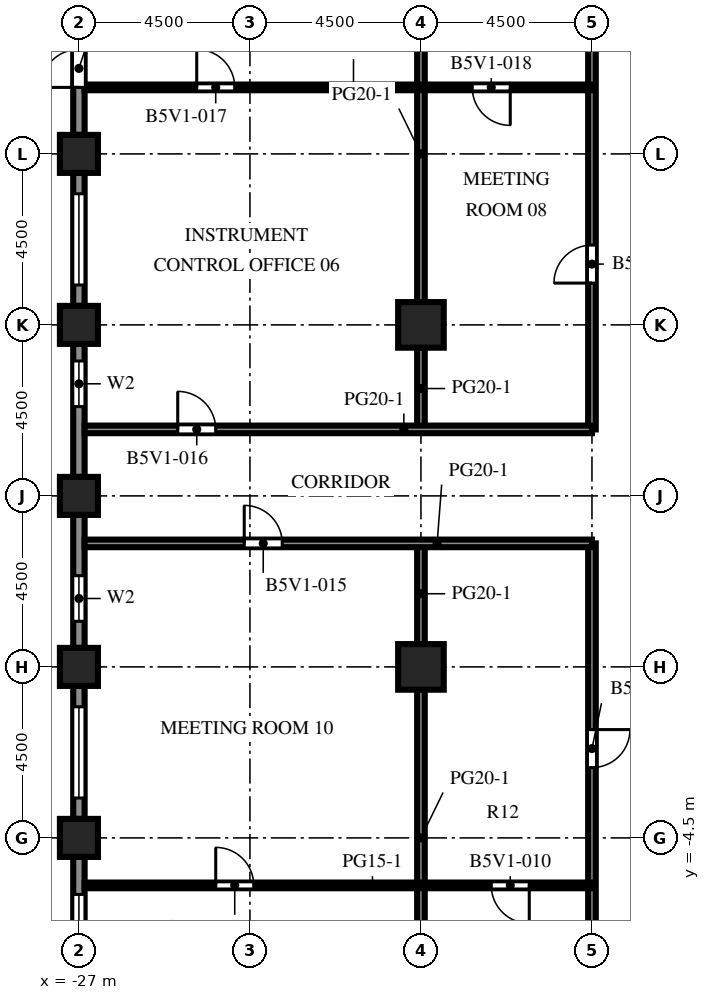
"""IFC4 building model, lengths in metres.
Left out: names, types, materials, properties, quantities, classifications, styles, units other than length and angle.
Written with IfcOpenShell. Run it as: python <this file> out.ifc"""

import sys

from ifc_helpers import new_model, si_unit, direction, frame, frame_2d, origin, origin_2d, place, context, subcontext, project, spatial, rectangle, extrude, element, fill, save


model = new_model("IFC4")
c1 = context("Model", 3, precision=1e-05, world=origin(), true_north=direction((0.0, 1.0)))
c2 = subcontext(c1, "Body", "Model", "MODEL_VIEW")
j1 = project(units=[si_unit("LENGTHUNIT", "METRE"), si_unit("PLANEANGLEUNIT", "RADIAN")], contexts=[c1])
p1 = place(None, origin())
s1 = spatial("IfcSite", under=j1, at=p1, CompositionType="ELEMENT")
p2 = place(p1, origin())
s2 = spatial("IfcBuilding", under=s1, at=p2, CompositionType="ELEMENT")
p3 = place(p2, frame((0.0, 0.0, 173.2)))
s3 = spatial("IfcBuildingStorey", under=s2, at=p3, CompositionType="ELEMENT", Elevation=173.2)
for number, where, z_axis, x_axis in (
    (1, (-27.0, -4.5, 0.0), (0.0, 0.0, 1.0), (1.0, 0.0, 0.0)),
    (2, (-27.0, 0.0, 0.0), (0.0, 0.0, 1.0), (1.0, 0.0, 0.0)),
    (3, (-27.0, 4.5, 0.0), (0.0, 0.0, 1.0), (1.0, 0.0, 0.0)),
    (4, (-27.0, 9.0, 0.0), (0.0, 0.0, 1.0), (1.0, 0.0, 0.0)),
    (5, (-27.0, 13.5, 0.0), (0.0, 0.0, 1.0), (1.0, 0.0, 0.0)),
):
    element("IfcColumn", number, at=place(p3, frame(where, z_axis=z_axis, x_axis=x_axis)), inside=s3, PredefinedType="COLUMN", context=c2, shape_type="SweptSolid", body=[
        extrude(rectangle(XDim=1.0, YDim=1.0, at=origin_2d()), origin(), (0.0, 0.0, 1.0), 4.1),
    ])
for number, where, z_axis, x_axis in (
    (6, (-18.0, 0.0, 0.0), (0.0, 0.0, 1.0), (1.0, 0.0, 0.0)),
    (7, (-18.0, 9.0, 0.0), (0.0, 0.0, 1.0), (1.0, 0.0, 0.0)),
):
    element("IfcColumn", number, at=place(p3, frame(where, z_axis=z_axis, x_axis=x_axis)), inside=s3, PredefinedType="COLUMN", context=c2, shape_type="SweptSolid", body=[
        extrude(rectangle(XDim=1.2, YDim=1.2, at=origin_2d()), origin(), (0.0, 0.0, 1.0), 4.1),
    ])
p4 = place(p3, frame((-27.0, 14.0, 0.0), z_axis=(0.0, 0.0, 1.0), x_axis=(0.0, 1.0, 0.0)))
e8 = element("IfcWall", 8, at=p4, inside=s3, PredefinedType="SOLIDWALL", context=c2, shape_type="SweptSolid", body=[
    extrude(rectangle(XDim=3.5, YDim=0.3, at=frame_2d((1.75, 0.0))), origin(), (0.0, 0.0, 1.0), 2.85),
])
p5 = place(p4, frame((1.25, 0.0, 0.0)))
e9 = element("IfcOpeningElement", 9, at=p5, cuts=e8, PredefinedType="OPENING", context=c2, shape_type="SweptSolid", body=[
    extrude(rectangle(XDim=1.0, YDim=2.2, at=frame_2d((0.5, 1.1))), frame((0.0, 0.16, 0.0), z_axis=(0.0, -1.0, 0.0), x_axis=(1.0, 0.0, 0.0)), (0.0, 0.0, 1.0), 0.32),
])
p6 = place(p3, frame((-27.0, 9.5, 0.0), z_axis=(0.0, 0.0, 1.0), x_axis=(0.0, 1.0, 0.0)))
e10 = element("IfcWall", 10, at=p6, inside=s3, PredefinedType="SOLIDWALL", context=c2, shape_type="SweptSolid", body=[
    extrude(rectangle(XDim=3.5, YDim=0.3, at=frame_2d((1.75, 0.0))), origin(), (0.0, 0.0, 1.0), 2.85),
])
p7 = place(p6, frame((0.55, 0.0, 0.8)))
e11 = element("IfcOpeningElement", 11, at=p7, cuts=e10, PredefinedType="OPENING", context=c2, shape_type="SweptSolid", body=[
    extrude(rectangle(XDim=2.4, YDim=1.7, at=frame_2d((1.2, 0.85))), frame((0.0, 0.16, 0.0), z_axis=(0.0, -1.0, 0.0), x_axis=(1.0, 0.0, 0.0)), (0.0, 0.0, 1.0), 0.32),
])
p8 = place(p3, frame((-27.0, 5.0, 0.0), z_axis=(0.0, 0.0, 1.0), x_axis=(0.0, 1.0, 0.0)))
e12 = element("IfcWall", 12, at=p8, inside=s3, PredefinedType="SOLIDWALL", context=c2, shape_type="SweptSolid", body=[
    extrude(rectangle(XDim=3.5, YDim=0.3, at=frame_2d((1.75, 0.0))), origin(), (0.0, 0.0, 1.0), 2.85),
])
p9 = place(p8, frame((1.85, 0.0, 0.8)))
e13 = element("IfcOpeningElement", 13, at=p9, cuts=e12, PredefinedType="OPENING", context=c2, shape_type="SweptSolid", body=[
    extrude(rectangle(XDim=1.2, YDim=1.7, at=frame_2d((0.6, 0.85))), frame((0.0, 0.16, 0.0), z_axis=(0.0, -1.0, 0.0), x_axis=(1.0, 0.0, 0.0)), (0.0, 0.0, 1.0), 0.32),
])
p10 = place(p3, frame((-27.0, 0.5, 0.0), z_axis=(0.0, 0.0, 1.0), x_axis=(0.0, 1.0, 0.0)))
e14 = element("IfcWall", 14, at=p10, inside=s3, PredefinedType="SOLIDWALL", context=c2, shape_type="SweptSolid", body=[
    extrude(rectangle(XDim=3.5, YDim=0.3, at=frame_2d((1.75, 0.0))), origin(), (0.0, 0.0, 1.0), 2.85),
])
p11 = place(p10, frame((0.7, 0.0, 0.8)))
e15 = element("IfcOpeningElement", 15, at=p11, cuts=e14, PredefinedType="OPENING", context=c2, shape_type="SweptSolid", body=[
    extrude(rectangle(XDim=1.2, YDim=1.7, at=frame_2d((0.6, 0.85))), frame((0.0, 0.16, 0.0), z_axis=(0.0, -1.0, 0.0), x_axis=(1.0, 0.0, 0.0)), (0.0, 0.0, 1.0), 0.32),
])
p12 = place(p3, frame((-27.0, -4.0, 0.0), z_axis=(0.0, 0.0, 1.0), x_axis=(0.0, 1.0, 0.0)))
e16 = element("IfcWall", 16, at=p12, inside=s3, PredefinedType="SOLIDWALL", context=c2, shape_type="SweptSolid", body=[
    extrude(rectangle(XDim=3.5, YDim=0.3, at=frame_2d((1.75, 0.0))), origin(), (0.0, 0.0, 1.0), 2.85),
])
p13 = place(p12, frame((0.55, 0.0, 0.8)))
e17 = element("IfcOpeningElement", 17, at=p13, cuts=e16, PredefinedType="OPENING", context=c2, shape_type="SweptSolid", body=[
    extrude(rectangle(XDim=2.4, YDim=1.7, at=frame_2d((1.2, 0.85))), frame((0.0, 0.16, 0.0), z_axis=(0.0, -1.0, 0.0), x_axis=(1.0, 0.0, 0.0)), (0.0, 0.0, 1.0), 0.32),
])
p14 = place(p3, frame((-27.0, -8.5, 0.0), z_axis=(0.0, 0.0, 1.0), x_axis=(0.0, 1.0, 0.0)))
e18 = element("IfcWall", 18, at=p14, inside=s3, PredefinedType="SOLIDWALL", context=c2, shape_type="SweptSolid", body=[
    extrude(rectangle(XDim=3.5, YDim=0.3, at=frame_2d((1.75, 0.0))), origin(), (0.0, 0.0, 1.0), 2.85),
])
p15 = place(p14, frame((0.113, 0.0, 0.8)))
e19 = element("IfcOpeningElement", 19, at=p15, cuts=e18, PredefinedType="OPENING", context=c2, shape_type="SweptSolid", body=[
    extrude(rectangle(XDim=2.4, YDim=1.7, at=frame_2d((1.2, 0.85))), frame((0.0, 0.16, 0.0), z_axis=(0.0, -1.0, 0.0), x_axis=(1.0, 0.0, 0.0)), (0.0, 0.0, 1.0), 0.32),
])
p16 = place(p3, frame((-18.0, -8.4, 0.0), z_axis=(0.0, 0.0, 1.0), x_axis=(0.0, 1.0, 0.0)))
e20 = element("IfcWall", 20, at=p16, inside=s3, PredefinedType="PARTITIONING", context=c2, shape_type="SweptSolid", body=[
    extrude(rectangle(XDim=7.8, YDim=0.2, at=frame_2d((3.9, 0.0))), origin(), (0.0, 0.0, 1.0), 3.65),
])
p17 = place(p3, frame((-18.0, 0.6, 0.0), z_axis=(0.0, 0.0, 1.0), x_axis=(0.0, 1.0, 0.0)))
e21 = element("IfcWall", 21, at=p17, inside=s3, PredefinedType="PARTITIONING", context=c2, shape_type="SweptSolid", body=[
    extrude(rectangle(XDim=2.65, YDim=0.2, at=frame_2d((1.325, 0.0))), origin(), (0.0, 0.0, 1.0), 3.65),
])
p18 = place(p3, frame((-18.0, 6.25, 0.0), z_axis=(0.0, 0.0, 1.0), x_axis=(0.0, 1.0, 0.0)))
e22 = element("IfcWall", 22, at=p18, inside=s3, PredefinedType="PARTITIONING", context=c2, shape_type="SweptSolid", body=[
    extrude(rectangle(XDim=2.15, YDim=0.2, at=frame_2d((1.075, 0.0))), origin(), (0.0, 0.0, 1.0), 3.65),
])
p19 = place(p3, frame((-18.0, 9.6, 0.0), z_axis=(0.0, 0.0, 1.0), x_axis=(0.0, 1.0, 0.0)))
e23 = element("IfcWall", 23, at=p19, inside=s3, PredefinedType="PARTITIONING", context=c2, shape_type="SweptSolid", body=[
    extrude(rectangle(XDim=7.8, YDim=0.2, at=frame_2d((3.9, 0.0))), origin(), (0.0, 0.0, 1.0), 3.65),
])
p20 = place(p3, frame((-13.5, -26.5, 0.0), z_axis=(0.0, 0.0, 1.0), x_axis=(0.0, 1.0, 0.0)))
e24 = element("IfcWall", 24, at=p20, inside=s3, PredefinedType="PARTITIONING", context=c2, shape_type="SweptSolid", body=[
    extrude(rectangle(XDim=29.75, YDim=0.2, at=frame_2d((14.875, 0.0))), origin(), (0.0, 0.0, 1.0), 3.65),
])
p21 = place(p20, frame((23.85, 0.0, 0.0)))
e25 = element("IfcOpeningElement", 25, at=p21, cuts=e24, PredefinedType="OPENING", context=c2, shape_type="SweptSolid", body=[
    extrude(rectangle(XDim=1.0, YDim=2.1, at=frame_2d((0.5, 1.05))), frame((0.0, 0.11, 0.0), z_axis=(0.0, -1.0, 0.0), x_axis=(1.0, 0.0, 0.0)), (0.0, 0.0, 1.0), 0.22),
])
p22 = place(p3, frame((-13.5, 6.25, 0.0), z_axis=(0.0, 0.0, 1.0), x_axis=(0.0, 1.0, 0.0)))
e26 = element("IfcWall", 26, at=p22, inside=s3, PredefinedType="PARTITIONING", context=c2, shape_type="SweptSolid", body=[
    extrude(rectangle(XDim=20.25, YDim=0.2, at=frame_2d((10.125, 0.0))), origin(), (0.0, 0.0, 1.0), 3.65),
])
p23 = place(p22, frame((3.85, 0.0, 0.0)))
e27 = element("IfcOpeningElement", 27, at=p23, cuts=e26, PredefinedType="OPENING", context=c2, shape_type="SweptSolid", body=[
    extrude(rectangle(XDim=1.0, YDim=2.1, at=frame_2d((0.5, 1.05))), frame((0.0, 0.11, 0.0), z_axis=(0.0, -1.0, 0.0), x_axis=(1.0, 0.0, 0.0)), (0.0, 0.0, 1.0), 0.22),
])
p24 = place(p3, frame((-13.5, -5.75, 0.0), z_axis=(0.0, 0.0, 1.0), x_axis=(-1.0, 0.0, 0.0)))
e28 = element("IfcWall", 28, at=p24, inside=s3, PredefinedType="PARTITIONING", context=c2, shape_type="SweptSolid", body=[
    extrude(rectangle(XDim=13.35, YDim=0.15, at=frame_2d((6.675, 0.0))), origin(), (0.0, 0.0, 1.0), 3.65),
])
p25 = place(p24, frame((8.9, 0.0, 0.0)))
e29 = element("IfcOpeningElement", 29, at=p25, cuts=e28, PredefinedType="OPENING", context=c2, shape_type="SweptSolid", body=[
    extrude(rectangle(XDim=1.0, YDim=2.1, at=frame_2d((0.5, 1.05))), frame((0.0, 0.085, 0.0), z_axis=(0.0, -1.0, 0.0), x_axis=(1.0, 0.0, 0.0)), (0.0, 0.0, 1.0), 0.17),
])
p26 = place(p24, frame((1.65, 0.0, 0.0)))
e30 = element("IfcOpeningElement", 30, at=p26, cuts=e28, PredefinedType="OPENING", context=c2, shape_type="SweptSolid", body=[
    extrude(rectangle(XDim=1.0, YDim=2.1, at=frame_2d((0.5, 1.05))), frame((0.0, 0.085, 0.0), z_axis=(0.0, -1.0, 0.0), x_axis=(1.0, 0.0, 0.0)), (0.0, 0.0, 1.0), 0.17),
])
p27 = place(p3, frame((-13.5, 3.25, 0.0), z_axis=(0.0, 0.0, 1.0), x_axis=(-1.0, 0.0, 0.0)))
e31 = element("IfcWall", 31, at=p27, inside=s3, PredefinedType="PARTITIONING", context=c2, shape_type="SweptSolid", body=[
    extrude(rectangle(XDim=13.35, YDim=0.2, at=frame_2d((6.675, 0.0))), origin(), (0.0, 0.0, 1.0), 3.65),
])
p28 = place(p27, frame((8.15, 0.0, 0.0)))
e32 = element("IfcOpeningElement", 32, at=p28, cuts=e31, PredefinedType="OPENING", context=c2, shape_type="SweptSolid", body=[
    extrude(rectangle(XDim=1.0, YDim=2.1, at=frame_2d((0.5, 1.05))), frame((0.0, 0.11, 0.0), z_axis=(0.0, -1.0, 0.0), x_axis=(1.0, 0.0, 0.0)), (0.0, 0.0, 1.0), 0.22),
])
p29 = place(p3, frame((-26.85, 6.25, 0.0), z_axis=(0.0, 0.0, 1.0), x_axis=(1.0, 0.0, 0.0)))
e33 = element("IfcWall", 33, at=p29, inside=s3, PredefinedType="PARTITIONING", context=c2, shape_type="SweptSolid", body=[
    extrude(rectangle(XDim=13.35, YDim=0.2, at=frame_2d((6.675, 0.0))), origin(), (0.0, 0.0, 1.0), 3.65),
])
p30 = place(p29, frame((2.45, 0.0, 0.0)))
e34 = element("IfcOpeningElement", 34, at=p30, cuts=e33, PredefinedType="OPENING", context=c2, shape_type="SweptSolid", body=[
    extrude(rectangle(XDim=1.0, YDim=2.1, at=frame_2d((0.5, 1.05))), frame((0.0, 0.11, 0.0), z_axis=(0.0, -1.0, 0.0), x_axis=(1.0, 0.0, 0.0)), (0.0, 0.0, 1.0), 0.22),
])
p31 = place(p3, frame((-26.85, 15.25, 0.0), z_axis=(0.0, 0.0, 1.0), x_axis=(1.0, 0.0, 0.0)))
e35 = element("IfcWall", 35, at=p31, inside=s3, PredefinedType="PARTITIONING", context=c2, shape_type="SweptSolid", body=[
    extrude(rectangle(XDim=13.35, YDim=0.15, at=frame_2d((6.675, 0.0))), origin(), (0.0, 0.0, 1.0), 3.65),
])
p32 = place(p31, frame((2.95, 0.0, 0.0)))
e36 = element("IfcOpeningElement", 36, at=p32, cuts=e35, PredefinedType="OPENING", context=c2, shape_type="SweptSolid", body=[
    extrude(rectangle(XDim=1.0, YDim=2.1, at=frame_2d((0.5, 1.05))), frame((0.0, 0.085, 0.0), z_axis=(0.0, -1.0, 0.0), x_axis=(1.0, 0.0, 0.0)), (0.0, 0.0, 1.0), 0.17),
])
p33 = place(p31, frame((10.2, 0.0, 0.0)))
e37 = element("IfcOpeningElement", 37, at=p33, cuts=e35, PredefinedType="OPENING", context=c2, shape_type="SweptSolid", body=[
    extrude(rectangle(XDim=1.0, YDim=2.1, at=frame_2d((0.5, 1.05))), frame((0.0, 0.085, 0.0), z_axis=(0.0, -1.0, 0.0), x_axis=(1.0, 0.0, 0.0)), (0.0, 0.0, 1.0), 0.17),
])
p34 = place(p5, origin())
e38 = element("IfcDoor", 38, at=p34, inside=s3, OperationType="SINGLE_SWING_LEFT", PredefinedType="DOOR", context=c2, shape_type="SweptSolid", body=[
    extrude(rectangle(XDim=1.0, YDim=2.2, at=frame_2d((0.5, 1.1))), frame((0.0, 0.025, 0.0), z_axis=(0.0, -1.0, 0.0), x_axis=(1.0, 0.0, 0.0)), (0.0, 0.0, 1.0), 0.05),
])
fill(e9, e38)
p35 = place(p7, origin())
e39 = element("IfcWindow", 39, at=p35, inside=s3, PartitioningType="SINGLE_PANEL", PredefinedType="WINDOW", context=c2, shape_type="SweptSolid", body=[
    extrude(rectangle(XDim=2.4, YDim=1.7, at=frame_2d((1.2, 0.85))), frame((0.0, 0.03, 0.0), z_axis=(0.0, -1.0, 0.0), x_axis=(1.0, 0.0, 0.0)), (0.0, 0.0, 1.0), 0.06),
])
fill(e11, e39)
p36 = place(p9, origin())
e40 = element("IfcWindow", 40, at=p36, inside=s3, PartitioningType="SINGLE_PANEL", PredefinedType="WINDOW", context=c2, shape_type="SweptSolid", body=[
    extrude(rectangle(XDim=1.2, YDim=1.7, at=frame_2d((0.6, 0.85))), frame((0.0, 0.03, 0.0), z_axis=(0.0, -1.0, 0.0), x_axis=(1.0, 0.0, 0.0)), (0.0, 0.0, 1.0), 0.06),
])
fill(e13, e40)
p37 = place(p11, origin())
e41 = element("IfcWindow", 41, at=p37, inside=s3, PartitioningType="SINGLE_PANEL", PredefinedType="WINDOW", context=c2, shape_type="SweptSolid", body=[
    extrude(rectangle(XDim=1.2, YDim=1.7, at=frame_2d((0.6, 0.85))), frame((0.0, 0.03, 0.0), z_axis=(0.0, -1.0, 0.0), x_axis=(1.0, 0.0, 0.0)), (0.0, 0.0, 1.0), 0.06),
])
fill(e15, e41)
p38 = place(p13, origin())
e42 = element("IfcWindow", 42, at=p38, inside=s3, PartitioningType="SINGLE_PANEL", PredefinedType="WINDOW", context=c2, shape_type="SweptSolid", body=[
    extrude(rectangle(XDim=2.4, YDim=1.7, at=frame_2d((1.2, 0.85))), frame((0.0, 0.03, 0.0), z_axis=(0.0, -1.0, 0.0), x_axis=(1.0, 0.0, 0.0)), (0.0, 0.0, 1.0), 0.06),
])
fill(e17, e42)
p39 = place(p15, origin())
e43 = element("IfcWindow", 43, at=p39, inside=s3, PartitioningType="SINGLE_PANEL", PredefinedType="WINDOW", context=c2, shape_type="SweptSolid", body=[
    extrude(rectangle(XDim=2.4, YDim=1.7, at=frame_2d((1.2, 0.85))), frame((0.0, 0.03, 0.0), z_axis=(0.0, -1.0, 0.0), x_axis=(1.0, 0.0, 0.0)), (0.0, 0.0, 1.0), 0.06),
])
fill(e19, e43)
p40 = place(p21, origin())
e44 = element("IfcDoor", 44, at=p40, inside=s3, OperationType="SINGLE_SWING_RIGHT", PredefinedType="DOOR", context=c2, shape_type="SweptSolid", body=[
    extrude(rectangle(XDim=1.0, YDim=2.1, at=frame_2d((0.5, 1.05))), frame((0.0, 0.025, 0.0), z_axis=(0.0, -1.0, 0.0), x_axis=(1.0, 0.0, 0.0)), (0.0, 0.0, 1.0), 0.05),
])
fill(e25, e44)
p41 = place(p23, origin())
e45 = element("IfcDoor", 45, at=p41, inside=s3, OperationType="SINGLE_SWING_LEFT", PredefinedType="DOOR", context=c2, shape_type="SweptSolid", body=[
    extrude(rectangle(XDim=1.0, YDim=2.1, at=frame_2d((0.5, 1.05))), frame((0.0, 0.025, 0.0), z_axis=(0.0, -1.0, 0.0), x_axis=(1.0, 0.0, 0.0)), (0.0, 0.0, 1.0), 0.05),
])
fill(e27, e45)
p42 = place(p25, origin())
e46 = element("IfcDoor", 46, at=p42, inside=s3, OperationType="SINGLE_SWING_RIGHT", PredefinedType="DOOR", context=c2, shape_type="SweptSolid", body=[
    extrude(rectangle(XDim=1.0, YDim=2.1, at=frame_2d((0.5, 1.05))), frame((0.0, 0.025, 0.0), z_axis=(0.0, -1.0, 0.0), x_axis=(1.0, 0.0, 0.0)), (0.0, 0.0, 1.0), 0.05),
])
fill(e29, e46)
p43 = place(p26, origin())
e47 = element("IfcDoor", 47, at=p43, inside=s3, OperationType="SINGLE_SWING_LEFT", PredefinedType="DOOR", context=c2, shape_type="SweptSolid", body=[
    extrude(rectangle(XDim=1.0, YDim=2.1, at=frame_2d((0.5, 1.05))), frame((0.0, 0.025, 0.0), z_axis=(0.0, -1.0, 0.0), x_axis=(1.0, 0.0, 0.0)), (0.0, 0.0, 1.0), 0.05),
])
fill(e30, e47)
p44 = place(p28, origin())
e48 = element("IfcDoor", 48, at=p44, inside=s3, OperationType="SINGLE_SWING_RIGHT", PredefinedType="DOOR", context=c2, shape_type="SweptSolid", body=[
    extrude(rectangle(XDim=1.0, YDim=2.1, at=frame_2d((0.5, 1.05))), frame((0.0, 0.025, 0.0), z_axis=(0.0, -1.0, 0.0), x_axis=(1.0, 0.0, 0.0)), (0.0, 0.0, 1.0), 0.05),
])
fill(e32, e48)
p45 = place(p30, origin())
e49 = element("IfcDoor", 49, at=p45, inside=s3, OperationType="SINGLE_SWING_LEFT", PredefinedType="DOOR", context=c2, shape_type="SweptSolid", body=[
    extrude(rectangle(XDim=1.0, YDim=2.1, at=frame_2d((0.5, 1.05))), frame((0.0, 0.025, 0.0), z_axis=(0.0, -1.0, 0.0), x_axis=(1.0, 0.0, 0.0)), (0.0, 0.0, 1.0), 0.05),
])
fill(e34, e49)
p46 = place(p32, origin())
e50 = element("IfcDoor", 50, at=p46, inside=s3, OperationType="SINGLE_SWING_LEFT", PredefinedType="DOOR", context=c2, shape_type="SweptSolid", body=[
    extrude(rectangle(XDim=1.0, YDim=2.1, at=frame_2d((0.5, 1.05))), frame((0.0, 0.025, 0.0), z_axis=(0.0, -1.0, 0.0), x_axis=(1.0, 0.0, 0.0)), (0.0, 0.0, 1.0), 0.05),
])
fill(e36, e50)
p47 = place(p33, origin())
e51 = element("IfcDoor", 51, at=p47, inside=s3, OperationType="SINGLE_SWING_RIGHT", PredefinedType="DOOR", context=c2, shape_type="SweptSolid", body=[
    extrude(rectangle(XDim=1.0, YDim=2.1, at=frame_2d((0.5, 1.05))), frame((0.0, 0.025, 0.0), z_axis=(0.0, -1.0, 0.0), x_axis=(1.0, 0.0, 0.0)), (0.0, 0.0, 1.0), 0.05),
])
fill(e37, e51)
save(model, sys.argv[1])
